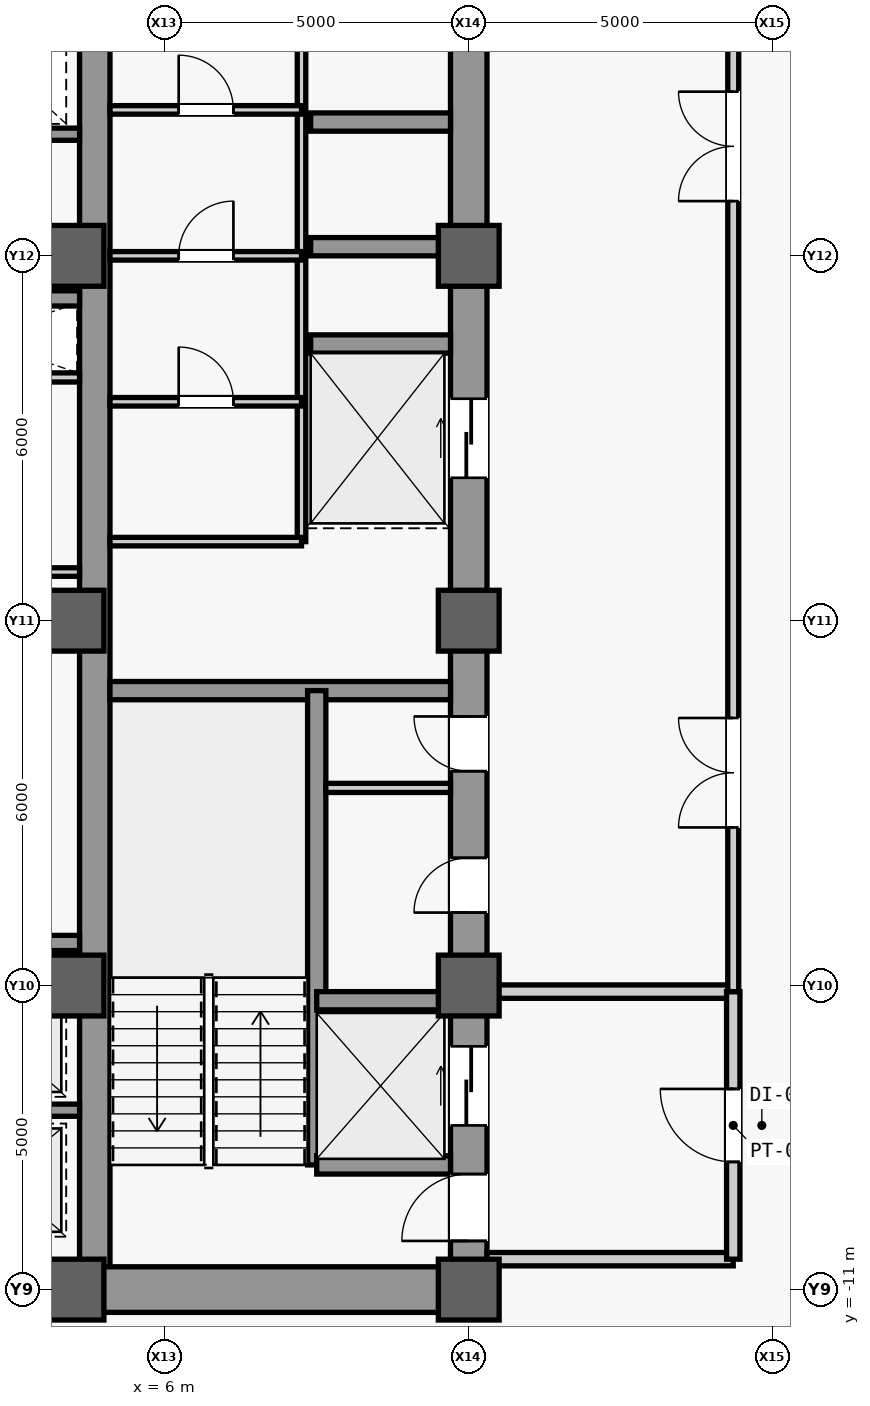
"""IFC4 building model, lengths in metres.
Left out: names, types, materials, properties, quantities, classifications, styles, units other than length and angle.
Written with IfcOpenShell. Run it as: python <this file> out.ifc"""

import sys

from ifc_helpers import new_model, si_unit, direction, frame, frame_2d, origin, origin_2d, place, context, subcontext, project, spatial, rectangle, extrude, source, transform, mapped, element, fill, save


model = new_model("IFC4")
c1 = context("Model", 3, precision=1e-05, world=origin(), true_north=direction((0.0, 1.0)))
c2 = subcontext(c1, "Body", "Model", "MODEL_VIEW")
j1 = project(units=[si_unit("LENGTHUNIT", "METRE"), si_unit("PLANEANGLEUNIT", "RADIAN")], contexts=[c1])
p1 = place(None, origin())
s1 = spatial("IfcSite", under=j1, at=p1, CompositionType="ELEMENT")
p2 = place(p1, origin())
s2 = spatial("IfcBuilding", under=s1, at=p2, CompositionType="ELEMENT")
p3 = place(p2, frame((0.0, 0.0, 103.7)))
s3 = spatial("IfcBuildingStorey", under=s2, at=p3, CompositionType="ELEMENT", Elevation=103.7)
m1 = source(origin(), c2, "Body", "SweptSolid", [
    extrude(rectangle(XDim=22.0, YDim=0.6, at=frame_2d((11.0, 0.0))), origin(), (0.0, 0.0, 1.0), 3.84),
])
p4 = place(p3, frame((11.0, -11.0, 0.0), z_axis=(0.0, 0.0, 1.0), x_axis=(0.0, 1.0, 0.0)))
e1 = element("IfcWall", 1, at=p4, inside=s3, PredefinedType="SHEAR", context=c2, shape_type="MappedRepresentation", body=[
    mapped(m1, transform((0.0, 0.0, 0.0), scale=1.0)),
])
m2 = source(origin(), c2, "Body", "SweptSolid", [
    extrude(rectangle(XDim=1.1, YDim=2.2, at=frame_2d((0.55, 1.1))), frame((0.0, 0.31, 0.0), z_axis=(0.0, -1.0, 0.0), x_axis=(1.0, 0.0, 0.0)), (0.0, 0.0, 1.0), 0.62),
])
p5 = place(p4, frame((0.8, 0.0, 0.0)))
e2 = element("IfcOpeningElement", 2, at=p5, cuts=e1, PredefinedType="OPENING", context=c2, shape_type="MappedRepresentation", body=[
    mapped(m2, transform((0.0, 0.0, 0.0), scale=1.0)),
])
m3 = source(origin(), c2, "Body", "SweptSolid", [
    extrude(rectangle(XDim=0.9, YDim=2.15, at=frame_2d((0.45, 1.075))), frame((0.0, 0.31, 0.0), z_axis=(0.0, -1.0, 0.0), x_axis=(1.0, 0.0, 0.0)), (0.0, 0.0, 1.0), 0.62),
])
p6 = place(p4, frame((6.2, 0.0, 0.0)))
e3 = element("IfcOpeningElement", 3, at=p6, cuts=e1, PredefinedType="OPENING", context=c2, shape_type="MappedRepresentation", body=[
    mapped(m3, transform((0.0, 0.0, 0.0), scale=1.0)),
])
p7 = place(p4, frame((8.525, 0.0, 0.0)))
e4 = element("IfcOpeningElement", 4, at=p7, cuts=e1, PredefinedType="OPENING", context=c2, shape_type="MappedRepresentation", body=[
    mapped(m3, transform((0.0, 0.0, 0.0), scale=1.0)),
])
m4 = source(origin(), c2, "Body", "SweptSolid", [
    extrude(rectangle(XDim=1.3, YDim=2.3, at=frame_2d((0.65, 1.15))), frame((0.0, 0.31, 0.0), z_axis=(0.0, -1.0, 0.0), x_axis=(1.0, 0.0, 0.0)), (0.0, 0.0, 1.0), 0.62),
])
p8 = place(p4, frame((2.7, 0.0, 0.0)))
e5 = element("IfcOpeningElement", 5, at=p8, cuts=e1, PredefinedType="OPENING", context=c2, shape_type="MappedRepresentation", body=[
    mapped(m4, transform((0.0, 0.0, 0.0), scale=1.0)),
])
p9 = place(p4, frame((13.35, 0.0, 0.0)))
e6 = element("IfcOpeningElement", 6, at=p9, cuts=e1, PredefinedType="OPENING", context=c2, shape_type="MappedRepresentation", body=[
    mapped(m4, transform((0.0, 0.0, 0.0), scale=1.0)),
])
m5 = source(origin(), c2, "Body", "SweptSolid", [
    extrude(rectangle(XDim=21.4, YDim=0.5, at=frame_2d((10.7, 0.0))), origin(), (0.0, 0.0, 1.0), 3.84),
])
p10 = place(p3, frame((4.85, -10.7, 0.0), z_axis=(0.0, 0.0, 1.0), x_axis=(0.0, 1.0, 0.0)))
e7 = element("IfcWall", 7, at=p10, inside=s3, PredefinedType="SHEAR", context=c2, shape_type="MappedRepresentation", body=[
    mapped(m5, transform((0.0, 0.0, 0.0), scale=1.0)),
])
m6 = source(origin(), c2, "Body", "SweptSolid", [
    extrude(rectangle(XDim=5.85, YDim=0.75, at=frame_2d((2.925, 0.0))), origin(), (0.0, 0.0, 1.0), 3.84),
])
p11 = place(p3, frame((4.85, -11.0, 0.0), z_axis=(0.0, 0.0, 1.0), x_axis=(1.0, 0.0, 0.0)))
e8 = element("IfcWall", 8, at=p11, inside=s3, PredefinedType="SHEAR", context=c2, shape_type="MappedRepresentation", body=[
    mapped(m6, transform((0.0, 0.0, 0.0), scale=1.0)),
])
m7 = source(origin(), c2, "Body", "SweptSolid", [
    extrude(rectangle(XDim=5.6, YDim=0.3, at=frame_2d((2.8, 0.0))), origin(), (0.0, 0.0, 1.0), 3.84),
])
p12 = place(p3, frame((5.1, -1.15, 0.0), z_axis=(0.0, 0.0, 1.0), x_axis=(1.0, 0.0, 0.0)))
e9 = element("IfcWall", 9, at=p12, inside=s3, PredefinedType="SHEAR", context=c2, shape_type="MappedRepresentation", body=[
    mapped(m7, transform((0.0, 0.0, 0.0), scale=1.0)),
])
m8 = source(origin(), c2, "Body", "SweptSolid", [
    extrude(rectangle(XDim=9.2, YDim=0.5, at=frame_2d((4.6, 0.0))), origin(), (0.0, 0.0, 1.0), 3.84),
])
p13 = place(p3, frame((-4.6, -11.0, 0.0), z_axis=(0.0, 0.0, 1.0), x_axis=(1.0, 0.0, 0.0)))
e10 = element("IfcWall", 10, at=p13, inside=s3, PredefinedType="SHEAR", context=c2, shape_type="MappedRepresentation", body=[
    mapped(m8, transform((0.0, 0.0, 0.0), scale=1.0)),
])
m9 = source(origin(), c2, "Body", "SweptSolid", [
    extrude(rectangle(XDim=1.8, YDim=2.25, at=frame_2d((0.9, 1.125))), frame((0.0, 0.26, 0.0), z_axis=(0.0, -1.0, 0.0), x_axis=(1.0, 0.0, 0.0)), (0.0, 0.0, 1.0), 0.52),
])
p14 = place(p13, frame((3.7, 0.0, 0.0)))
e11 = element("IfcOpeningElement", 11, at=p14, cuts=e10, PredefinedType="OPENING", context=c2, shape_type="MappedRepresentation", body=[
    mapped(m9, transform((0.0, 0.0, 0.0), scale=1.0)),
])
m10 = source(origin(), c2, "Body", "SweptSolid", [
    extrude(rectangle(XDim=1.0, YDim=1.0, at=origin_2d()), origin(), (0.0, 0.0, 1.0), 4.1),
])
for number, where, z_axis, x_axis in (
    (12, (4.5, -11.0, 0.0), (0.0, 0.0, 1.0), (1.0, 0.0, 0.0)),
    (13, (4.5, -6.0, 0.0), (0.0, 0.0, 1.0), (1.0, 0.0, 0.0)),
    (14, (4.5, 0.0, 0.0), (0.0, 0.0, 1.0), (1.0, 0.0, 0.0)),
    (15, (4.5, 6.0, 0.0), (0.0, 0.0, 1.0), (1.0, 0.0, 0.0)),
    (16, (11.0, -11.0, 0.0), (0.0, 0.0, 1.0), (1.0, 0.0, 0.0)),
    (17, (11.0, -6.0, 0.0), (0.0, 0.0, 1.0), (1.0, 0.0, 0.0)),
    (18, (11.0, 0.0, 0.0), (0.0, 0.0, 1.0), (1.0, 0.0, 0.0)),
    (19, (11.0, 6.0, 0.0), (0.0, 0.0, 1.0), (1.0, 0.0, 0.0)),
):
    element("IfcColumn", number, at=place(p3, frame(where, z_axis=z_axis, x_axis=x_axis)), inside=s3, PredefinedType="COLUMN", context=c2, shape_type="MappedRepresentation", body=[
        mapped(m10, transform((0.0, 0.0, 0.0), scale=1.0)),
    ])
m11 = source(origin(), c2, "Body", "SweptSolid", [
    extrude(rectangle(XDim=7.8, YDim=0.3, at=frame_2d((3.9, 0.0))), origin(), (0.0, 0.0, 1.0), 3.84),
])
p15 = place(p3, frame((8.5, -8.95, 0.0), z_axis=(0.0, 0.0, 1.0), x_axis=(0.0, 1.0, 0.0)))
e20 = element("IfcWall", 20, at=p15, inside=s3, PredefinedType="SHEAR", context=c2, shape_type="MappedRepresentation", body=[
    mapped(m11, transform((0.0, 0.0, 0.0), scale=1.0)),
])
m12 = source(origin(), c2, "Body", "SweptSolid", [
    extrude(rectangle(XDim=2.2, YDim=0.3, at=frame_2d((1.1, 0.0))), origin(), (0.0, 0.0, 1.0), 3.84),
])
for number, where, z_axis, x_axis in (
    (21, (8.5, -8.95, 0.0), (0.0, 0.0, 1.0), (1.0, 0.0, 0.0)),
    (22, (8.5, -6.25, 0.0), (0.0, 0.0, 1.0), (1.0, 0.0, 0.0)),
):
    element("IfcWall", number, at=place(p3, frame(where, z_axis=z_axis, x_axis=x_axis)), inside=s3, PredefinedType="SHEAR", context=c2, shape_type="MappedRepresentation", body=[
        mapped(m12, transform((0.0, 0.0, 0.0), scale=1.0)),
    ])
m13 = source(origin(), c2, "Body", "SweptSolid", [
    extrude(rectangle(XDim=2.3, YDim=0.3, at=frame_2d((1.15, 0.0))), origin(), (0.0, 0.0, 1.0), 3.84),
])
for number, where, z_axis, x_axis in (
    (23, (8.4, 4.55, 0.0), (0.0, 0.0, 1.0), (1.0, 0.0, 0.0)),
    (24, (8.4, 6.15, 0.0), (0.0, 0.0, 1.0), (1.0, 0.0, 0.0)),
    (25, (8.4, 8.2, 0.0), (0.0, 0.0, 1.0), (1.0, 0.0, 0.0)),
):
    element("IfcWall", number, at=place(p3, frame(where, z_axis=z_axis, x_axis=x_axis)), inside=s3, PredefinedType="SHEAR", context=c2, shape_type="MappedRepresentation", body=[
        mapped(m13, transform((0.0, 0.0, 0.0), scale=1.0)),
    ])
m14 = source(origin(), c2, "Body", "SweptSolid", [
    extrude(rectangle(XDim=2.05, YDim=0.15, at=frame_2d((1.025, 0.0))), origin(), (0.0, 0.0, 1.0), 3.84),
])
p16 = place(p3, frame((8.65, -2.75, 0.0), z_axis=(0.0, 0.0, 1.0), x_axis=(1.0, 0.0, 0.0)))
e26 = element("IfcWall", 26, at=p16, inside=s3, PredefinedType="PARTITIONING", context=c2, shape_type="MappedRepresentation", body=[
    mapped(m14, transform((0.0, 0.0, 0.0), scale=1.0)),
])
m15 = source(origin(), c2, "Body", "SweptSolid", [
    extrude(rectangle(XDim=9.4, YDim=0.14, at=frame_2d((4.7, 0.0))), origin(), (0.0, 0.0, 1.0), 3.84),
])
p17 = place(p3, frame((8.25, 1.3, 0.0), z_axis=(0.0, 0.0, 1.0), x_axis=(0.0, 1.0, 0.0)))
e27 = element("IfcWall", 27, at=p17, inside=s3, PredefinedType="PARTITIONING", context=c2, shape_type="MappedRepresentation", body=[
    mapped(m15, transform((0.0, 0.0, 0.0), scale=1.0)),
])
m16 = source(origin(), c2, "Body", "SweptSolid", [
    extrude(rectangle(XDim=3.15, YDim=0.14, at=frame_2d((1.575, 0.0))), origin(), (0.0, 0.0, 1.0), 3.84),
])
p18 = place(p3, frame((5.1, 1.3, 0.0), z_axis=(0.0, 0.0, 1.0), x_axis=(1.0, 0.0, 0.0)))
e28 = element("IfcWall", 28, at=p18, inside=s3, PredefinedType="PARTITIONING", context=c2, shape_type="MappedRepresentation", body=[
    mapped(m16, transform((0.0, 0.0, 0.0), scale=1.0)),
])
p19 = place(p3, frame((5.1, 8.4, 0.0), z_axis=(0.0, 0.0, 1.0), x_axis=(1.0, 0.0, 0.0)))
e29 = element("IfcWall", 29, at=p19, inside=s3, PredefinedType="PARTITIONING", context=c2, shape_type="MappedRepresentation", body=[
    mapped(m16, transform((0.0, 0.0, 0.0), scale=1.0)),
])
m17 = source(origin(), c2, "Body", "SweptSolid", [
    extrude(rectangle(XDim=0.9, YDim=2.15, at=frame_2d((0.45, 1.075))), frame((0.0, 0.08, 0.0), z_axis=(0.0, -1.0, 0.0), x_axis=(1.0, 0.0, 0.0)), (0.0, 0.0, 1.0), 0.16),
])
p20 = place(p19, frame((1.13, 0.0, 0.0)))
e30 = element("IfcOpeningElement", 30, at=p20, cuts=e29, PredefinedType="OPENING", context=c2, shape_type="MappedRepresentation", body=[
    mapped(m17, transform((0.0, 0.0, 0.0), scale=1.0)),
])
p21 = place(p3, frame((5.1, 6.0, 0.0), z_axis=(0.0, 0.0, 1.0), x_axis=(1.0, 0.0, 0.0)))
e31 = element("IfcWall", 31, at=p21, inside=s3, PredefinedType="PARTITIONING", context=c2, shape_type="MappedRepresentation", body=[
    mapped(m16, transform((0.0, 0.0, 0.0), scale=1.0)),
])
p22 = place(p21, frame((1.13, 0.0, 0.0)))
e32 = element("IfcOpeningElement", 32, at=p22, cuts=e31, PredefinedType="OPENING", context=c2, shape_type="MappedRepresentation", body=[
    mapped(m17, transform((0.0, 0.0, 0.0), scale=1.0)),
])
p23 = place(p3, frame((5.1, 3.6, 0.0), z_axis=(0.0, 0.0, 1.0), x_axis=(1.0, 0.0, 0.0)))
e33 = element("IfcWall", 33, at=p23, inside=s3, PredefinedType="PARTITIONING", context=c2, shape_type="MappedRepresentation", body=[
    mapped(m16, transform((0.0, 0.0, 0.0), scale=1.0)),
])
p24 = place(p23, frame((1.13, 0.0, 0.0)))
e34 = element("IfcOpeningElement", 34, at=p24, cuts=e33, PredefinedType="OPENING", context=c2, shape_type="MappedRepresentation", body=[
    mapped(m17, transform((0.0, 0.0, 0.0), scale=1.0)),
])
m18 = source(origin(), c2, "Body", "SweptSolid", [
    extrude(rectangle(XDim=4.05, YDim=0.22, at=frame_2d((2.025, 0.0))), origin(), (0.0, 0.0, 1.0), 3.84),
])
p25 = place(p3, frame((11.3, -10.5, 0.0), z_axis=(0.0, 0.0, 1.0), x_axis=(1.0, 0.0, 0.0)))
e35 = element("IfcWall", 35, at=p25, inside=s3, PredefinedType="PARTITIONING", context=c2, shape_type="MappedRepresentation", body=[
    mapped(m18, transform((0.0, 0.0, 0.0), scale=1.0)),
])
m19 = source(origin(), c2, "Body", "SweptSolid", [
    extrude(rectangle(XDim=4.05, YDim=0.22, at=frame_2d((2.025, 0.0))), origin(), (0.0, 0.0, 1.0), 3.067),
])
p26 = place(p3, frame((11.3, -6.1, 0.0), z_axis=(0.0, 0.0, 1.0), x_axis=(1.0, 0.0, 0.0)))
e36 = element("IfcWall", 36, at=p26, inside=s3, PredefinedType="PARTITIONING", context=c2, shape_type="MappedRepresentation", body=[
    mapped(m19, transform((0.0, 0.0, 0.0), scale=1.0)),
])
m20 = source(origin(), c2, "Body", "SweptSolid", [
    extrude(rectangle(XDim=4.4, YDim=0.22, at=frame_2d((2.2, 0.0))), origin(), (0.0, 0.0, 1.0), 3.84),
])
p27 = place(p3, frame((15.35, -10.5, 0.0), z_axis=(0.0, 0.0, 1.0), x_axis=(0.0, 1.0, 0.0)))
e37 = element("IfcWall", 37, at=p27, inside=s3, PredefinedType="PARTITIONING", context=c2, shape_type="MappedRepresentation", body=[
    mapped(m20, transform((0.0, 0.0, 0.0), scale=1.0)),
])
m21 = source(origin(), c2, "Body", "SweptSolid", [
    extrude(rectangle(XDim=1.2, YDim=2.2, at=frame_2d((0.6, 1.1))), frame((0.0, 0.12, 0.0), z_axis=(0.0, -1.0, 0.0), x_axis=(1.0, 0.0, 0.0)), (0.0, 0.0, 1.0), 0.24),
])
p28 = place(p27, frame((1.6, 0.0, 0.0)))
e38 = element("IfcOpeningElement", 38, at=p28, cuts=e37, PredefinedType="OPENING", context=c2, shape_type="MappedRepresentation", body=[
    mapped(m21, transform((0.0, 0.0, 0.0), scale=1.0)),
])
m22 = source(origin(), c2, "Body", "SweptSolid", [
    extrude(rectangle(XDim=16.6, YDim=0.18, at=frame_2d((8.3, 0.0))), origin(), (0.0, 0.0, 1.0), 3.84),
])
p29 = place(p3, frame((15.35, -6.1, 0.0), z_axis=(0.0, 0.0, 1.0), x_axis=(0.0, 1.0, 0.0)))
e39 = element("IfcWall", 39, at=p29, inside=s3, PredefinedType="PARTITIONING", context=c2, shape_type="MappedRepresentation", body=[
    mapped(m22, transform((0.0, 0.0, 0.0), scale=1.0)),
])
m23 = source(origin(), c2, "Body", "SweptSolid", [
    extrude(rectangle(XDim=1.8, YDim=2.25, at=frame_2d((0.9, 1.125))), frame((0.0, 0.1, 0.0), z_axis=(0.0, -1.0, 0.0), x_axis=(1.0, 0.0, 0.0)), (0.0, 0.0, 1.0), 0.2),
])
p30 = place(p29, frame((2.7, 0.0, 0.0)))
e40 = element("IfcOpeningElement", 40, at=p30, cuts=e39, PredefinedType="OPENING", context=c2, shape_type="MappedRepresentation", body=[
    mapped(m23, transform((0.0, 0.0, 0.0), scale=1.0)),
])
p31 = place(p29, frame((13.0, 0.0, 0.0)))
e41 = element("IfcOpeningElement", 41, at=p31, cuts=e39, PredefinedType="OPENING", context=c2, shape_type="MappedRepresentation", body=[
    mapped(m23, transform((0.0, 0.0, 0.0), scale=1.0)),
])
m24 = source(origin(), c2, "Body", "SweptSolid", [
    extrude(rectangle(XDim=3.45, YDim=0.15, at=frame_2d((1.725, 0.0))), origin(), (0.0, 0.0, 1.0), 3.84),
])
p32 = place(p3, frame((1.15, 4.0, 0.0), z_axis=(0.0, 0.0, 1.0), x_axis=(1.0, 0.0, 0.0)))
e42 = element("IfcWall", 42, at=p32, inside=s3, PredefinedType="PARTITIONING", context=c2, shape_type="MappedRepresentation", body=[
    mapped(m24, transform((0.0, 0.0, 0.0), scale=1.0)),
])
m25 = source(origin(), c2, "Body", "SweptSolid", [
    extrude(rectangle(XDim=2.45, YDim=0.2, at=frame_2d((1.225, 0.0))), origin(), (0.0, 0.0, 1.0), 3.84),
])
p33 = place(p3, frame((2.15, -8.05, 0.0), z_axis=(0.0, 0.0, 1.0), x_axis=(1.0, 0.0, 0.0)))
e43 = element("IfcWall", 43, at=p33, inside=s3, PredefinedType="SHEAR", context=c2, shape_type="MappedRepresentation", body=[
    mapped(m25, transform((0.0, 0.0, 0.0), scale=1.0)),
])
m26 = source(origin(), c2, "Body", "SweptSolid", [
    extrude(rectangle(XDim=9.2, YDim=0.25, at=frame_2d((4.6, 0.0))), origin(), (0.0, 0.0, 1.0), 3.84),
])
p34 = place(p3, frame((-4.6, -5.3, 0.0), z_axis=(0.0, 0.0, 1.0), x_axis=(1.0, 0.0, 0.0)))
e44 = element("IfcWall", 44, at=p34, inside=s3, PredefinedType="SHEAR", context=c2, shape_type="MappedRepresentation", body=[
    mapped(m26, transform((0.0, 0.0, 0.0), scale=1.0)),
])
m27 = source(origin(), c2, "Body", "SweptSolid", [
    extrude(rectangle(XDim=1.05, YDim=2.2, at=frame_2d((0.525, 1.1))), frame((0.0, 0.135, 0.0), z_axis=(0.0, -1.0, 0.0), x_axis=(1.0, 0.0, 0.0)), (0.0, 0.0, 1.0), 0.27),
])
p35 = place(p34, frame((4.075, 0.0, 0.0)))
e45 = element("IfcOpeningElement", 45, at=p35, cuts=e44, PredefinedType="OPENING", context=c2, shape_type="MappedRepresentation", body=[
    mapped(m27, transform((0.0, 0.0, 0.0), scale=1.0)),
])
p36 = place(p3, frame((2.15, 8.0, 0.0), z_axis=(0.0, 0.0, 1.0), x_axis=(1.0, 0.0, 0.0)))
e46 = element("IfcWall", 46, at=p36, inside=s3, PredefinedType="SHEAR", context=c2, shape_type="MappedRepresentation", body=[
    mapped(m25, transform((0.0, 0.0, 0.0), scale=1.0)),
])
p37 = place(p3, frame((-4.6, 5.3, 0.0), z_axis=(0.0, 0.0, 1.0), x_axis=(1.0, 0.0, 0.0)))
e47 = element("IfcWall", 47, at=p37, inside=s3, PredefinedType="SHEAR", context=c2, shape_type="MappedRepresentation", body=[
    mapped(m26, transform((0.0, 0.0, 0.0), scale=1.0)),
])
p38 = place(p37, frame((4.075, 0.0, 0.0)))
e48 = element("IfcOpeningElement", 48, at=p38, cuts=e47, PredefinedType="OPENING", context=c2, shape_type="MappedRepresentation", body=[
    mapped(m27, transform((0.0, 0.0, 0.0), scale=1.0)),
])
m28 = source(origin(), c2, "Body", "SweptSolid", [
    extrude(rectangle(XDim=3.45, YDim=0.14, at=frame_2d((1.725, 0.0))), origin(), (0.0, 0.0, 1.0), 3.84),
])
p39 = place(p3, frame((1.15, 0.8, 0.0), z_axis=(0.0, 0.0, 1.0), x_axis=(1.0, 0.0, 0.0)))
e49 = element("IfcWall", 49, at=p39, inside=s3, PredefinedType="PARTITIONING", context=c2, shape_type="MappedRepresentation", body=[
    mapped(m28, transform((0.0, 0.0, 0.0), scale=1.0)),
])
m29 = source(origin(), c2, "Body", "SweptSolid", [
    extrude(rectangle(XDim=1.1, YDim=2.2, at=frame_2d((0.55, 1.1))), frame((0.0, 0.025, 0.0), z_axis=(0.0, -1.0, 0.0), x_axis=(1.0, 0.0, 0.0)), (0.0, 0.0, 1.0), 0.05),
])
p40 = place(p5, origin())
e50 = element("IfcDoor", 50, at=p40, inside=s3, OperationType="SINGLE_SWING_LEFT", PredefinedType="DOOR", context=c2, shape_type="MappedRepresentation", body=[
    mapped(m29, transform((0.0, 0.0, 0.0), scale=1.0)),
])
fill(e2, e50)
m30 = source(origin(), c2, "Body", "SweptSolid", [
    extrude(rectangle(XDim=0.9, YDim=2.15, at=frame_2d((0.45, 1.075))), frame((0.0, 0.025, 0.0), z_axis=(0.0, -1.0, 0.0), x_axis=(1.0, 0.0, 0.0)), (0.0, 0.0, 1.0), 0.05),
])
p41 = place(p6, origin())
e51 = element("IfcDoor", 51, at=p41, inside=s3, OperationType="SINGLE_SWING_LEFT", PredefinedType="DOOR", context=c2, shape_type="MappedRepresentation", body=[
    mapped(m30, transform((0.0, 0.0, 0.0), scale=1.0)),
])
fill(e3, e51)
p42 = place(p7, origin())
e52 = element("IfcDoor", 52, at=p42, inside=s3, OperationType="SINGLE_SWING_RIGHT", PredefinedType="DOOR", context=c2, shape_type="MappedRepresentation", body=[
    mapped(m30, transform((0.0, 0.0, 0.0), scale=1.0)),
])
fill(e4, e52)
p43 = place(p20, origin())
e53 = element("IfcDoor", 53, at=p43, inside=s3, OperationType="SINGLE_SWING_LEFT", PredefinedType="DOOR", context=c2, shape_type="MappedRepresentation", body=[
    mapped(m30, transform((0.0, 0.0, 0.0), scale=1.0)),
])
fill(e30, e53)
p44 = place(p22, origin())
e54 = element("IfcDoor", 54, at=p44, inside=s3, OperationType="SINGLE_SWING_RIGHT", PredefinedType="DOOR", context=c2, shape_type="MappedRepresentation", body=[
    mapped(m30, transform((0.0, 0.0, 0.0), scale=1.0)),
])
fill(e32, e54)
p45 = place(p24, origin())
e55 = element("IfcDoor", 55, at=p45, inside=s3, OperationType="SINGLE_SWING_LEFT", PredefinedType="DOOR", context=c2, shape_type="MappedRepresentation", body=[
    mapped(m30, transform((0.0, 0.0, 0.0), scale=1.0)),
])
fill(e34, e55)
m31 = source(origin(), c2, "Body", "SweptSolid", [
    extrude(rectangle(XDim=1.2, YDim=2.2, at=frame_2d((0.6, 1.1))), frame((0.0, 0.025, 0.0), z_axis=(0.0, -1.0, 0.0), x_axis=(1.0, 0.0, 0.0)), (0.0, 0.0, 1.0), 0.05),
])
p46 = place(p28, origin())
e56 = element("IfcDoor", 56, at=p46, inside=s3, OperationType="SINGLE_SWING_RIGHT", PredefinedType="DOOR", context=c2, shape_type="MappedRepresentation", body=[
    mapped(m31, transform((0.0, 0.0, 0.0), scale=1.0)),
])
fill(e38, e56)
m32 = source(origin(), c2, "Body", "SweptSolid", [
    extrude(rectangle(XDim=1.8, YDim=2.25, at=frame_2d((0.9, 1.125))), frame((0.0, 0.025, 0.0), z_axis=(0.0, -1.0, 0.0), x_axis=(1.0, 0.0, 0.0)), (0.0, 0.0, 1.0), 0.05),
])
p47 = place(p30, origin())
e57 = element("IfcDoor", 57, at=p47, inside=s3, OperationType="SINGLE_SWING_RIGHT", PredefinedType="DOOR", context=c2, shape_type="MappedRepresentation", body=[
    mapped(m32, transform((0.0, 0.0, 0.0), scale=1.0)),
])
fill(e40, e57)
p48 = place(p31, origin())
e58 = element("IfcDoor", 58, at=p48, inside=s3, OperationType="SINGLE_SWING_LEFT", PredefinedType="DOOR", context=c2, shape_type="MappedRepresentation", body=[
    mapped(m32, transform((0.0, 0.0, 0.0), scale=1.0)),
])
fill(e41, e58)
m33 = source(origin(), c2, "Body", "SweptSolid", [
    extrude(rectangle(XDim=1.3, YDim=2.3, at=frame_2d((0.65, 1.15))), frame((0.0, 0.025, 0.0), z_axis=(0.0, -1.0, 0.0), x_axis=(1.0, 0.0, 0.0)), (0.0, 0.0, 1.0), 0.05),
])
p49 = place(p8, origin())
e59 = element("IfcDoor", 59, at=p49, inside=s3, OperationType="SLIDING_TO_LEFT", PredefinedType="DOOR", context=c2, shape_type="MappedRepresentation", body=[
    mapped(m33, transform((0.0, 0.0, 0.0), scale=1.0)),
])
fill(e5, e59)
p50 = place(p9, origin())
e60 = element("IfcDoor", 60, at=p50, inside=s3, OperationType="SLIDING_TO_LEFT", PredefinedType="DOOR", context=c2, shape_type="MappedRepresentation", body=[
    mapped(m33, transform((0.0, 0.0, 0.0), scale=1.0)),
])
fill(e6, e60)
save(model, sys.argv[1])
